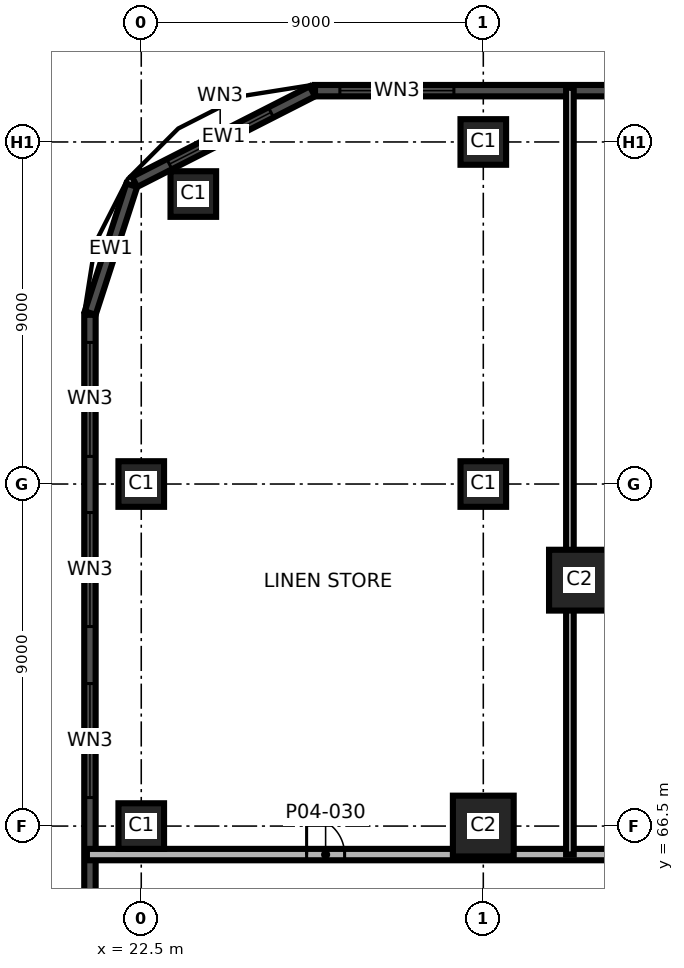
"""IFC4 building model, lengths in metres.
Left out: names, types, materials, properties, quantities, classifications, styles, units other than length and angle.
Written with IfcOpenShell. Run it as: python <this file> out.ifc"""

import sys

from ifc_helpers import new_model, si_unit, direction, frame, frame_2d, origin, origin_2d, place, context, subcontext, project, spatial, rectangle, extrude, element, fill, save


model = new_model("IFC4")
c1 = context("Model", 3, precision=1e-05, world=origin(), true_north=direction((0.0, 1.0)))
c2 = subcontext(c1, "Body", "Model", "MODEL_VIEW")
j1 = project(units=[si_unit("LENGTHUNIT", "METRE"), si_unit("PLANEANGLEUNIT", "RADIAN")], contexts=[c1])
p1 = place(None, origin())
s1 = spatial("IfcSite", under=j1, at=p1, CompositionType="ELEMENT")
p2 = place(p1, origin())
s2 = spatial("IfcBuilding", under=s1, at=p2, CompositionType="ELEMENT")
p3 = place(p2, frame((0.0, 0.0, 23.5)))
s3 = spatial("IfcBuildingStorey", under=s2, at=p3, CompositionType="ELEMENT", Elevation=23.5)
p4 = place(p3, frame((22.5, 66.5, 0.0), z_axis=(0.0, 0.0, 1.0), x_axis=(1.0, 0.0, 0.0)))
e1 = element("IfcColumn", 1, at=p4, inside=s3, PredefinedType="COLUMN", context=c2, shape_type="SweptSolid", body=[
    extrude(rectangle(XDim=1.2, YDim=1.2, at=origin_2d()), origin(), (0.0, 0.0, 1.0), 5.0),
])
p5 = place(p3, frame((31.5, 66.5, 0.0), z_axis=(0.0, 0.0, 1.0), x_axis=(1.0, 0.0, 0.0)))
e2 = element("IfcColumn", 2, at=p5, inside=s3, PredefinedType="COLUMN", context=c2, shape_type="SweptSolid", body=[
    extrude(rectangle(XDim=1.6, YDim=1.6, at=origin_2d()), origin(), (0.0, 0.0, 1.0), 5.0),
])
for number, where, z_axis, x_axis in (
    (3, (22.5, 75.5, 0.0), (0.0, 0.0, 1.0), (1.0, 0.0, 0.0)),
    (4, (31.5, 75.5, 0.0), (0.0, 0.0, 1.0), (1.0, 0.0, 0.0)),
    (5, (23.87, 83.13, 0.0), (0.0, 0.0, 1.0), (1.0, 0.0, 0.0)),
    (6, (31.5, 84.5, 0.0), (0.0, 0.0, 1.0), (1.0, 0.0, 0.0)),
):
    element("IfcColumn", number, at=place(p3, frame(where, z_axis=z_axis, x_axis=x_axis)), inside=s3, PredefinedType="COLUMN", context=c2, shape_type="SweptSolid", body=[
        extrude(rectangle(XDim=1.2, YDim=1.2, at=origin_2d()), origin(), (0.0, 0.0, 1.0), 5.0),
    ])
p6 = place(p3, frame((34.03, 72.97, 0.0), z_axis=(0.0, 0.0, 1.0), x_axis=(1.0, 0.0, 0.0)))
e7 = element("IfcColumn", 7, at=p6, inside=s3, PredefinedType="COLUMN", context=c2, shape_type="SweptSolid", body=[
    extrude(rectangle(XDim=1.6, YDim=1.6, at=origin_2d()), origin(), (0.0, 0.0, 1.0), 5.0),
])
p7 = place(p3, frame((53.952, 85.85, 0.0), z_axis=(0.0, 0.0, 1.0), x_axis=(-1.0, 0.0, 0.0)))
e8 = element("IfcWall", 8, at=p7, inside=s3, PredefinedType="SOLIDWALL", context=c2, shape_type="SweptSolid", body=[
    extrude(rectangle(XDim=26.88, YDim=0.3, at=frame_2d((13.44, 0.0))), origin(), (0.0, 0.0, 1.0), 4.7),
])
p8 = place(p7, frame((5.202, 0.0, 0.9)))
e9 = element("IfcOpeningElement", 9, at=p8, cuts=e8, PredefinedType="OPENING", context=c2, shape_type="SweptSolid", body=[
    extrude(rectangle(XDim=3.0, YDim=2.4, at=frame_2d((1.5, 1.2))), frame((0.0, 0.16, 0.0), z_axis=(0.0, -1.0, 0.0), x_axis=(1.0, 0.0, 0.0)), (0.0, 0.0, 1.0), 0.32),
])
p9 = place(p7, frame((9.702, 0.0, 0.9)))
e10 = element("IfcOpeningElement", 10, at=p9, cuts=e8, PredefinedType="OPENING", context=c2, shape_type="SweptSolid", body=[
    extrude(rectangle(XDim=3.0, YDim=2.4, at=frame_2d((1.5, 1.2))), frame((0.0, 0.16, 0.0), z_axis=(0.0, -1.0, 0.0), x_axis=(1.0, 0.0, 0.0)), (0.0, 0.0, 1.0), 0.32),
])
p10 = place(p7, frame((14.202, 0.0, 0.9)))
e11 = element("IfcOpeningElement", 11, at=p10, cuts=e8, PredefinedType="OPENING", context=c2, shape_type="SweptSolid", body=[
    extrude(rectangle(XDim=3.0, YDim=2.4, at=frame_2d((1.5, 1.2))), frame((0.0, 0.16, 0.0), z_axis=(0.0, -1.0, 0.0), x_axis=(1.0, 0.0, 0.0)), (0.0, 0.0, 1.0), 0.32),
])
p11 = place(p7, frame((23.226, 0.0, 0.9)))
e12 = element("IfcOpeningElement", 12, at=p11, cuts=e8, PredefinedType="OPENING", context=c2, shape_type="SweptSolid", body=[
    extrude(rectangle(XDim=3.0, YDim=2.4, at=frame_2d((1.5, 1.2))), frame((0.0, 0.16, 0.0), z_axis=(0.0, -1.0, 0.0), x_axis=(1.0, 0.0, 0.0)), (0.0, 0.0, 1.0), 0.32),
])
p12 = place(p3, frame((27.004, 85.834, 0.0), z_axis=(0.0, 0.0, 1.0), x_axis=(-0.890998339455, -0.454006562826, 0.0)))
e13 = element("IfcWall", 13, at=p12, inside=s3, PredefinedType="SOLIDWALL", context=c2, shape_type="SweptSolid", body=[
    extrude(rectangle(XDim=5.252, YDim=0.3, at=frame_2d((2.626, 0.0))), origin(), (0.0, 0.0, 1.0), 4.7),
])
p13 = place(p12, frame((1.224, 0.0, 0.9)))
e14 = element("IfcOpeningElement", 14, at=p13, cuts=e13, PredefinedType="OPENING", context=c2, shape_type="SweptSolid", body=[
    extrude(rectangle(XDim=3.0, YDim=2.4, at=frame_2d((1.5, 1.2))), frame((0.0, 0.16, 0.0), z_axis=(0.0, -1.0, 0.0), x_axis=(1.0, 0.0, 0.0)), (0.0, 0.0, 1.0), 0.32),
])
p14 = place(p3, frame((22.25, 83.362, 0.0), z_axis=(0.0, 0.0, 1.0), x_axis=(-0.309073584194, -0.951038127287, 0.0)))
e15 = element("IfcWall", 15, at=p14, inside=s3, PredefinedType="SOLIDWALL", context=c2, shape_type="SweptSolid", body=[
    extrude(rectangle(XDim=3.536, YDim=0.3, at=frame_2d((1.768, 0.0))), origin(), (0.0, 0.0, 1.0), 4.7),
])
p15 = place(p3, frame((21.15, 79.952, 0.0), z_axis=(0.0, 0.0, 1.0), x_axis=(0.0, -1.0, 0.0)))
e16 = element("IfcWall", 16, at=p15, inside=s3, PredefinedType="SOLIDWALL", context=c2, shape_type="SweptSolid", body=[
    extrude(rectangle(XDim=62.88, YDim=0.3, at=frame_2d((31.44, 0.0))), origin(), (0.0, 0.0, 1.0), 4.7),
])
p16 = place(p15, frame((0.726, 0.0, 0.9)))
e17 = element("IfcOpeningElement", 17, at=p16, cuts=e16, PredefinedType="OPENING", context=c2, shape_type="SweptSolid", body=[
    extrude(rectangle(XDim=3.0, YDim=2.4, at=frame_2d((1.5, 1.2))), frame((0.0, 0.16, 0.0), z_axis=(0.0, -1.0, 0.0), x_axis=(1.0, 0.0, 0.0)), (0.0, 0.0, 1.0), 0.32),
])
p17 = place(p15, frame((5.202, 0.0, 0.9)))
e18 = element("IfcOpeningElement", 18, at=p17, cuts=e16, PredefinedType="OPENING", context=c2, shape_type="SweptSolid", body=[
    extrude(rectangle(XDim=3.0, YDim=2.4, at=frame_2d((1.5, 1.2))), frame((0.0, 0.16, 0.0), z_axis=(0.0, -1.0, 0.0), x_axis=(1.0, 0.0, 0.0)), (0.0, 0.0, 1.0), 0.32),
])
p18 = place(p15, frame((9.702, 0.0, 0.9)))
e19 = element("IfcOpeningElement", 19, at=p18, cuts=e16, PredefinedType="OPENING", context=c2, shape_type="SweptSolid", body=[
    extrude(rectangle(XDim=3.0, YDim=2.4, at=frame_2d((1.5, 1.2))), frame((0.0, 0.16, 0.0), z_axis=(0.0, -1.0, 0.0), x_axis=(1.0, 0.0, 0.0)), (0.0, 0.0, 1.0), 0.32),
])
p19 = place(p15, frame((27.702, 0.0, 0.9)))
e20 = element("IfcOpeningElement", 20, at=p19, cuts=e16, PredefinedType="OPENING", context=c2, shape_type="SweptSolid", body=[
    extrude(rectangle(XDim=3.0, YDim=2.4, at=frame_2d((1.5, 1.2))), frame((0.0, 0.16, 0.0), z_axis=(0.0, -1.0, 0.0), x_axis=(1.0, 0.0, 0.0)), (0.0, 0.0, 1.0), 0.32),
])
p20 = place(p15, frame((41.202, 0.0, 0.9)))
e21 = element("IfcOpeningElement", 21, at=p20, cuts=e16, PredefinedType="OPENING", context=c2, shape_type="SweptSolid", body=[
    extrude(rectangle(XDim=3.0, YDim=2.4, at=frame_2d((1.5, 1.2))), frame((0.0, 0.16, 0.0), z_axis=(0.0, -1.0, 0.0), x_axis=(1.0, 0.0, 0.0)), (0.0, 0.0, 1.0), 0.32),
])
p21 = place(p15, frame((45.702, 0.0, 0.9)))
e22 = element("IfcOpeningElement", 22, at=p21, cuts=e16, PredefinedType="OPENING", context=c2, shape_type="SweptSolid", body=[
    extrude(rectangle(XDim=3.0, YDim=2.4, at=frame_2d((1.5, 1.2))), frame((0.0, 0.16, 0.0), z_axis=(0.0, -1.0, 0.0), x_axis=(1.0, 0.0, 0.0)), (0.0, 0.0, 1.0), 0.32),
])
p22 = place(p15, frame((50.202, 0.0, 0.9)))
e23 = element("IfcOpeningElement", 23, at=p22, cuts=e16, PredefinedType="OPENING", context=c2, shape_type="SweptSolid", body=[
    extrude(rectangle(XDim=3.0, YDim=2.4, at=frame_2d((1.5, 1.2))), frame((0.0, 0.16, 0.0), z_axis=(0.0, -1.0, 0.0), x_axis=(1.0, 0.0, 0.0)), (0.0, 0.0, 1.0), 0.32),
])
p23 = place(p15, frame((54.702, 0.0, 0.9)))
e24 = element("IfcOpeningElement", 24, at=p23, cuts=e16, PredefinedType="OPENING", context=c2, shape_type="SweptSolid", body=[
    extrude(rectangle(XDim=3.0, YDim=2.4, at=frame_2d((1.5, 1.2))), frame((0.0, 0.16, 0.0), z_axis=(0.0, -1.0, 0.0), x_axis=(1.0, 0.0, 0.0)), (0.0, 0.0, 1.0), 0.32),
])
p24 = place(p15, frame((59.226, 0.0, 0.9)))
e25 = element("IfcOpeningElement", 25, at=p24, cuts=e16, PredefinedType="OPENING", context=c2, shape_type="SweptSolid", body=[
    extrude(rectangle(XDim=3.0, YDim=2.4, at=frame_2d((1.5, 1.2))), frame((0.0, 0.16, 0.0), z_axis=(0.0, -1.0, 0.0), x_axis=(1.0, 0.0, 0.0)), (0.0, 0.0, 1.0), 0.32),
])
p25 = place(p3, frame((21.07, 65.75, 0.0), z_axis=(0.0, 0.0, 1.0), x_axis=(1.0, 0.0, 0.0)))
e26 = element("IfcWall", 26, at=p25, inside=s3, PredefinedType="SHEAR", context=c2, shape_type="SweptSolid", body=[
    extrude(rectangle(XDim=38.86, YDim=0.3, at=frame_2d((19.43, 0.0))), origin(), (0.0, 0.0, 1.0), 4.7),
])
p26 = place(p25, frame((20.68, 0.0, 0.0)))
e27 = element("IfcOpeningElement", 27, at=p26, cuts=e26, PredefinedType="OPENING", context=c2, shape_type="SweptSolid", body=[
    extrude(rectangle(XDim=1.2, YDim=2.1, at=frame_2d((0.6, 1.05))), frame((0.0, 0.16, 0.0), z_axis=(0.0, -1.0, 0.0), x_axis=(1.0, 0.0, 0.0)), (0.0, 0.0, 1.0), 0.32),
])
p27 = place(p25, frame((14.77, 0.0, 0.0)))
e28 = element("IfcOpeningElement", 28, at=p27, cuts=e26, PredefinedType="OPENING", context=c2, shape_type="SweptSolid", body=[
    extrude(rectangle(XDim=1.0, YDim=2.1, at=frame_2d((0.5, 1.05))), frame((0.0, 0.16, 0.0), z_axis=(0.0, -1.0, 0.0), x_axis=(1.0, 0.0, 0.0)), (0.0, 0.0, 1.0), 0.32),
])
p28 = place(p25, frame((25.839, 0.0, 0.0)))
e29 = element("IfcOpeningElement", 29, at=p28, cuts=e26, PredefinedType="OPENING", context=c2, shape_type="SweptSolid", body=[
    extrude(rectangle(XDim=1.0, YDim=2.1, at=frame_2d((0.5, 1.05))), frame((0.0, 0.16, 0.0), z_axis=(0.0, -1.0, 0.0), x_axis=(1.0, 0.0, 0.0)), (0.0, 0.0, 1.0), 0.32),
])
p29 = place(p25, frame((5.781, 0.0, 0.0)))
e30 = element("IfcOpeningElement", 30, at=p29, cuts=e26, PredefinedType="OPENING", context=c2, shape_type="SweptSolid", body=[
    extrude(rectangle(XDim=1.0, YDim=2.1, at=frame_2d((0.5, 1.05))), frame((0.0, 0.16, 0.0), z_axis=(0.0, -1.0, 0.0), x_axis=(1.0, 0.0, 0.0)), (0.0, 0.0, 1.0), 0.32),
])
p30 = place(p25, frame((33.578, 0.0, 0.0)))
e31 = element("IfcOpeningElement", 31, at=p30, cuts=e26, PredefinedType="OPENING", context=c2, shape_type="SweptSolid", body=[
    extrude(rectangle(XDim=1.0, YDim=2.1, at=frame_2d((0.5, 1.05))), frame((0.0, 0.16, 0.0), z_axis=(0.0, -1.0, 0.0), x_axis=(1.0, 0.0, 0.0)), (0.0, 0.0, 1.0), 0.32),
])
p31 = place(p3, frame((33.779, 65.75, 0.0), z_axis=(0.0, 0.0, 1.0), x_axis=(0.0, 1.0, 0.0)))
e32 = element("IfcWall", 32, at=p31, inside=s3, PredefinedType="PARTITIONING", context=c2, shape_type="SweptSolid", body=[
    extrude(rectangle(XDim=20.18, YDim=0.2, at=frame_2d((10.09, 0.0))), origin(), (0.0, 0.0, 1.0), 4.7),
])
p32 = place(p11, origin())
e33 = element("IfcWindow", 33, at=p32, inside=s3, PartitioningType="SINGLE_PANEL", PredefinedType="WINDOW", context=c2, shape_type="SweptSolid", body=[
    extrude(rectangle(XDim=3.0, YDim=2.4, at=frame_2d((1.5, 1.2))), frame((0.0, 0.03, 0.0), z_axis=(0.0, -1.0, 0.0), x_axis=(1.0, 0.0, 0.0)), (0.0, 0.0, 1.0), 0.06),
])
fill(e12, e33)
p33 = place(p13, origin())
e34 = element("IfcWindow", 34, at=p33, inside=s3, PartitioningType="SINGLE_PANEL", PredefinedType="WINDOW", context=c2, shape_type="SweptSolid", body=[
    extrude(rectangle(XDim=3.0, YDim=2.4, at=frame_2d((1.5, 1.2))), frame((0.0, 0.03, 0.0), z_axis=(0.0, -1.0, 0.0), x_axis=(1.0, 0.0, 0.0)), (0.0, 0.0, 1.0), 0.06),
])
fill(e14, e34)
p34 = place(p16, origin())
e35 = element("IfcWindow", 35, at=p34, inside=s3, PartitioningType="SINGLE_PANEL", PredefinedType="WINDOW", context=c2, shape_type="SweptSolid", body=[
    extrude(rectangle(XDim=3.0, YDim=2.4, at=frame_2d((1.5, 1.2))), frame((0.0, 0.03, 0.0), z_axis=(0.0, -1.0, 0.0), x_axis=(1.0, 0.0, 0.0)), (0.0, 0.0, 1.0), 0.06),
])
fill(e17, e35)
p35 = place(p17, origin())
e36 = element("IfcWindow", 36, at=p35, inside=s3, PartitioningType="SINGLE_PANEL", PredefinedType="WINDOW", context=c2, shape_type="SweptSolid", body=[
    extrude(rectangle(XDim=3.0, YDim=2.4, at=frame_2d((1.5, 1.2))), frame((0.0, 0.03, 0.0), z_axis=(0.0, -1.0, 0.0), x_axis=(1.0, 0.0, 0.0)), (0.0, 0.0, 1.0), 0.06),
])
fill(e18, e36)
p36 = place(p18, origin())
e37 = element("IfcWindow", 37, at=p36, inside=s3, PartitioningType="SINGLE_PANEL", PredefinedType="WINDOW", context=c2, shape_type="SweptSolid", body=[
    extrude(rectangle(XDim=3.0, YDim=2.4, at=frame_2d((1.5, 1.2))), frame((0.0, 0.03, 0.0), z_axis=(0.0, -1.0, 0.0), x_axis=(1.0, 0.0, 0.0)), (0.0, 0.0, 1.0), 0.06),
])
fill(e19, e37)
p37 = place(p29, origin())
e38 = element("IfcDoor", 38, at=p37, inside=s3, OperationType="SINGLE_SWING_RIGHT", PredefinedType="DOOR", context=c2, shape_type="SweptSolid", body=[
    extrude(rectangle(XDim=1.0, YDim=2.1, at=frame_2d((0.5, 1.05))), frame((0.0, 0.025, 0.0), z_axis=(0.0, -1.0, 0.0), x_axis=(1.0, 0.0, 0.0)), (0.0, 0.0, 1.0), 0.05),
])
fill(e30, e38)
save(model, sys.argv[1])
